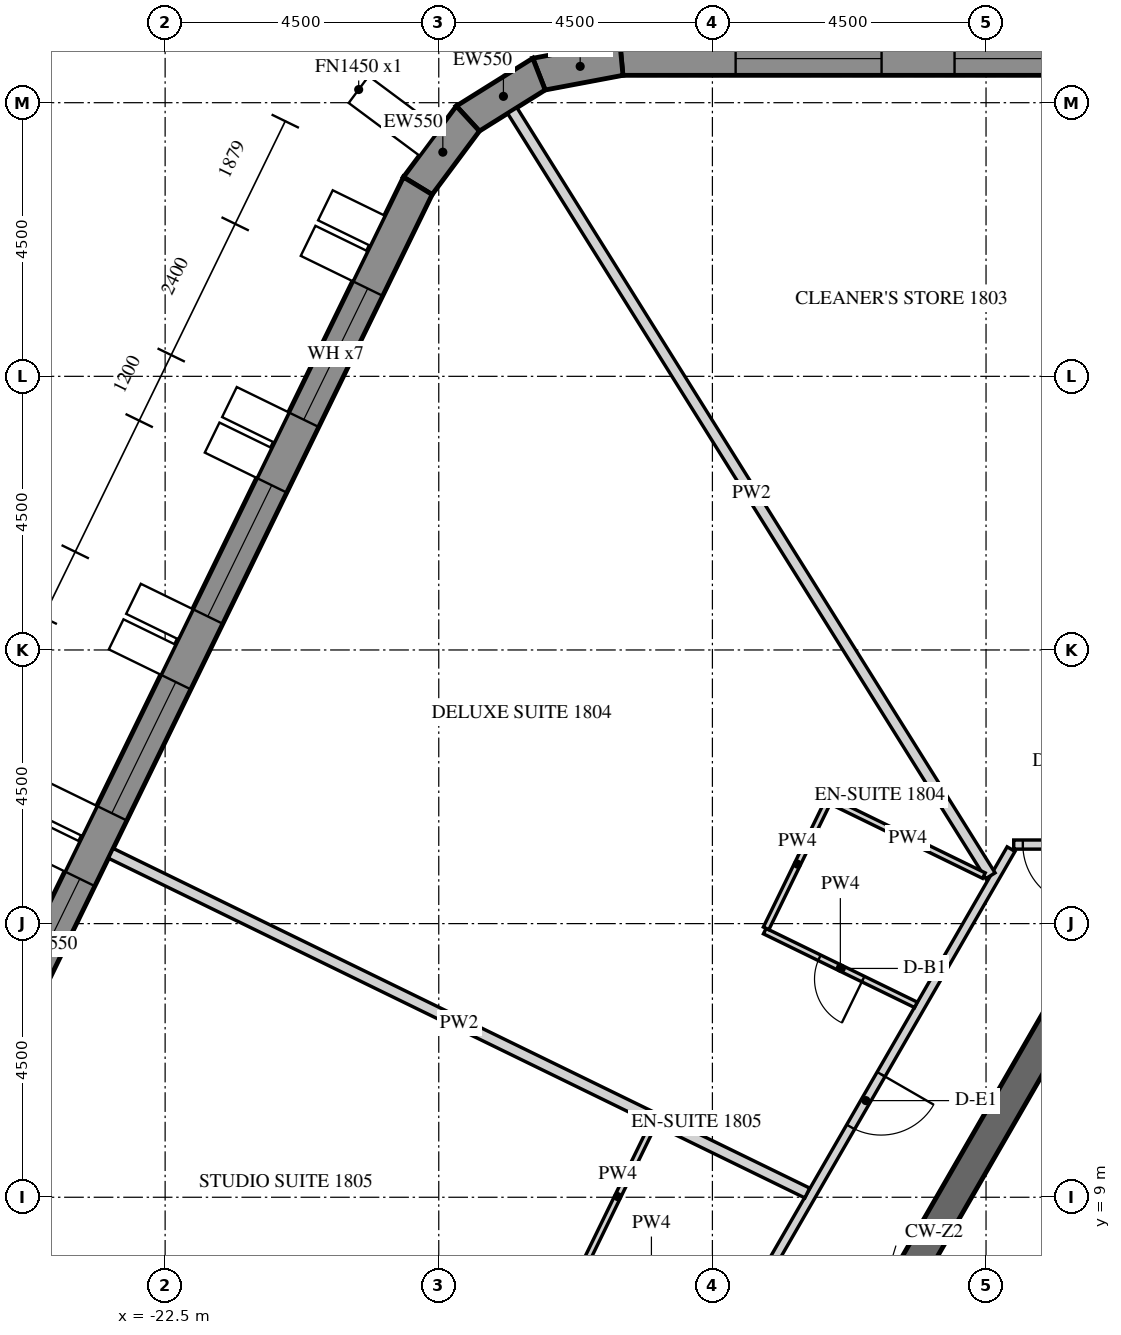
"""IFC4 building model, lengths in metres.
Left out: names, types, materials, properties, quantities, classifications, styles, units other than length and angle.
Written with IfcOpenShell. Run it as: python <this file> out.ifc"""

import sys

from ifc_helpers import new_model, si_unit, direction, frame, frame_2d, origin, place, context, subcontext, project, spatial, polyline, rectangle, outline, extrude, element, fill, save


model = new_model("IFC4")
c1 = context("Model", 3, precision=1e-05, world=origin(), true_north=direction((0.0, 1.0)))
c2 = subcontext(c1, "Body", "Model", "MODEL_VIEW")
j1 = project(units=[si_unit("LENGTHUNIT", "METRE"), si_unit("PLANEANGLEUNIT", "RADIAN")], contexts=[c1])
p1 = place(None, origin())
s1 = spatial("IfcSite", under=j1, at=p1, CompositionType="ELEMENT")
p2 = place(p1, origin())
s2 = spatial("IfcBuilding", under=s1, at=p2, CompositionType="ELEMENT")
p3 = place(p2, frame((0.0, 0.0, 226.8)))
s3 = spatial("IfcBuildingStorey", under=s2, at=p3, CompositionType="ELEMENT", Elevation=226.8)
p4 = place(p3, frame((12.761, 27.725, -0.15), z_axis=(0.0, 0.0, 1.0), x_axis=(-1.0, 0.0, 0.0)))
e1 = element("IfcWall", 1, at=p4, inside=s3, PredefinedType="SOLIDWALL", context=c2, shape_type="SweptSolid", body=[
    extrude(outline(polyline([(-0.022, -0.275), (27.783, -0.275), (27.732, 0.275), (0.022, 0.275), (-0.022, -0.275)])), origin(), (0.0, 0.0, 1.0), 3.9),
])
p5 = place(p4, frame((1.879, 0.0, 1.05)))
e2 = element("IfcOpeningElement", 2, at=p5, cuts=e1, PredefinedType="OPENING", context=c2, shape_type="SweptSolid", body=[
    extrude(rectangle(XDim=2.4, YDim=2.4, at=frame_2d((1.2, 1.2))), frame((0.0, 0.285, 0.0), z_axis=(0.0, -1.0, 0.0), x_axis=(1.0, 0.0, 0.0)), (0.0, 0.0, 1.0), 0.57),
])
p6 = place(p4, frame((5.479, 0.0, 1.05)))
e3 = element("IfcOpeningElement", 3, at=p6, cuts=e1, PredefinedType="OPENING", context=c2, shape_type="SweptSolid", body=[
    extrude(rectangle(XDim=2.4, YDim=2.4, at=frame_2d((1.2, 1.2))), frame((0.0, 0.285, 0.0), z_axis=(0.0, -1.0, 0.0), x_axis=(1.0, 0.0, 0.0)), (0.0, 0.0, 1.0), 0.57),
])
p7 = place(p4, frame((9.079, 0.0, 1.05)))
e4 = element("IfcOpeningElement", 4, at=p7, cuts=e1, PredefinedType="OPENING", context=c2, shape_type="SweptSolid", body=[
    extrude(rectangle(XDim=2.4, YDim=2.4, at=frame_2d((1.2, 1.2))), frame((0.0, 0.285, 0.0), z_axis=(0.0, -1.0, 0.0), x_axis=(1.0, 0.0, 0.0)), (0.0, 0.0, 1.0), 0.57),
])
p8 = place(p4, frame((12.679, 0.0, 1.05)))
e5 = element("IfcOpeningElement", 5, at=p8, cuts=e1, PredefinedType="OPENING", context=c2, shape_type="SweptSolid", body=[
    extrude(rectangle(XDim=2.4, YDim=2.4, at=frame_2d((1.2, 1.2))), frame((0.0, 0.285, 0.0), z_axis=(0.0, -1.0, 0.0), x_axis=(1.0, 0.0, 0.0)), (0.0, 0.0, 1.0), 0.57),
])
p9 = place(p4, frame((16.279, 0.0, 1.05)))
e6 = element("IfcOpeningElement", 6, at=p9, cuts=e1, PredefinedType="OPENING", context=c2, shape_type="SweptSolid", body=[
    extrude(rectangle(XDim=2.4, YDim=2.4, at=frame_2d((1.2, 1.2))), frame((0.0, 0.285, 0.0), z_axis=(0.0, -1.0, 0.0), x_axis=(1.0, 0.0, 0.0)), (0.0, 0.0, 1.0), 0.57),
])
p10 = place(p4, frame((19.879, 0.0, 1.05)))
e7 = element("IfcOpeningElement", 7, at=p10, cuts=e1, PredefinedType="OPENING", context=c2, shape_type="SweptSolid", body=[
    extrude(rectangle(XDim=2.4, YDim=2.4, at=frame_2d((1.2, 1.2))), frame((0.0, 0.285, 0.0), z_axis=(0.0, -1.0, 0.0), x_axis=(1.0, 0.0, 0.0)), (0.0, 0.0, 1.0), 0.57),
])
p11 = place(p4, frame((23.479, 0.0, 1.05)))
e8 = element("IfcOpeningElement", 8, at=p11, cuts=e1, PredefinedType="OPENING", context=c2, shape_type="SweptSolid", body=[
    extrude(rectangle(XDim=2.4, YDim=2.4, at=frame_2d((1.2, 1.2))), frame((0.0, 0.285, 0.0), z_axis=(0.0, -1.0, 0.0), x_axis=(1.0, 0.0, 0.0)), (0.0, 0.0, 1.0), 0.57),
])
p12 = place(p3, frame((-14.997, 27.725, -0.15), z_axis=(0.0, 0.0, 1.0), x_axis=(-0.982705443133, -0.185175624845, 0.0)))
e9 = element("IfcWall", 9, at=p12, inside=s3, PredefinedType="SOLIDWALL", context=c2, shape_type="SweptSolid", body=[
    extrude(outline(polyline([(-0.026, -0.275), (1.431, -0.275), (1.327, 0.275), (0.026, 0.275), (-0.026, -0.275)])), origin(), (0.0, 0.0, 1.0), 3.9),
])
p13 = place(p3, frame((-16.352, 27.47, -0.15), z_axis=(0.0, 0.0, 1.0), x_axis=(-0.848057977594, -0.5299034503, 0.0)))
e10 = element("IfcWall", 10, at=p13, inside=s3, PredefinedType="SOLIDWALL", context=c2, shape_type="SweptSolid", body=[
    extrude(outline(polyline([(-0.052, -0.275), (1.431, -0.275), (1.327, 0.275), (0.052, 0.275), (-0.052, -0.275)])), origin(), (0.0, 0.0, 1.0), 3.9),
])
p14 = place(p3, frame((-17.521, 26.739, -0.15), z_axis=(0.0, 0.0, 1.0), x_axis=(-0.597135295884, -0.802140535324, 0.0)))
e11 = element("IfcWall", 11, at=p14, inside=s3, PredefinedType="SOLIDWALL", context=c2, shape_type="SweptSolid", body=[
    extrude(outline(polyline([(-0.052, -0.275), (1.405, -0.275), (1.354, 0.275), (0.052, 0.275), (-0.052, -0.275)])), origin(), (0.0, 0.0, 1.0), 3.9),
])
p15 = place(p3, frame((-18.345, 25.633, -0.15), z_axis=(0.0, 0.0, 1.0), x_axis=(-0.43837181828, -0.898793718791, 0.0)))
e12 = element("IfcWall", 12, at=p15, inside=s3, PredefinedType="SOLIDWALL", context=c2, shape_type="SweptSolid", body=[
    extrude(outline(polyline([(-0.026, -0.275), (27.78, -0.275), (27.735, 0.275), (0.026, 0.275), (-0.026, -0.275)])), origin(), (0.0, 0.0, 1.0), 3.9),
])
p16 = place(p15, frame((1.879, 0.0, 1.05)))
e13 = element("IfcOpeningElement", 13, at=p16, cuts=e12, PredefinedType="OPENING", context=c2, shape_type="SweptSolid", body=[
    extrude(rectangle(XDim=2.4, YDim=2.4, at=frame_2d((1.2, 1.2))), frame((0.0, 0.285, 0.0), z_axis=(0.0, -1.0, 0.0), x_axis=(1.0, 0.0, 0.0)), (0.0, 0.0, 1.0), 0.57),
])
p17 = place(p15, frame((5.479, 0.0, 1.05)))
e14 = element("IfcOpeningElement", 14, at=p17, cuts=e12, PredefinedType="OPENING", context=c2, shape_type="SweptSolid", body=[
    extrude(rectangle(XDim=2.4, YDim=2.4, at=frame_2d((1.2, 1.2))), frame((0.0, 0.285, 0.0), z_axis=(0.0, -1.0, 0.0), x_axis=(1.0, 0.0, 0.0)), (0.0, 0.0, 1.0), 0.57),
])
p18 = place(p15, frame((9.079, 0.0, 1.05)))
e15 = element("IfcOpeningElement", 15, at=p18, cuts=e12, PredefinedType="OPENING", context=c2, shape_type="SweptSolid", body=[
    extrude(rectangle(XDim=2.4, YDim=2.4, at=frame_2d((1.2, 1.2))), frame((0.0, 0.285, 0.0), z_axis=(0.0, -1.0, 0.0), x_axis=(1.0, 0.0, 0.0)), (0.0, 0.0, 1.0), 0.57),
])
p19 = place(p15, frame((12.679, 0.0, 1.05)))
e16 = element("IfcOpeningElement", 16, at=p19, cuts=e12, PredefinedType="OPENING", context=c2, shape_type="SweptSolid", body=[
    extrude(rectangle(XDim=2.4, YDim=2.4, at=frame_2d((1.2, 1.2))), frame((0.0, 0.285, 0.0), z_axis=(0.0, -1.0, 0.0), x_axis=(1.0, 0.0, 0.0)), (0.0, 0.0, 1.0), 0.57),
])
p20 = place(p15, frame((16.279, 0.0, 1.05)))
e17 = element("IfcOpeningElement", 17, at=p20, cuts=e12, PredefinedType="OPENING", context=c2, shape_type="SweptSolid", body=[
    extrude(rectangle(XDim=2.4, YDim=2.4, at=frame_2d((1.2, 1.2))), frame((0.0, 0.285, 0.0), z_axis=(0.0, -1.0, 0.0), x_axis=(1.0, 0.0, 0.0)), (0.0, 0.0, 1.0), 0.57),
])
p21 = place(p15, frame((19.879, 0.0, 1.05)))
e18 = element("IfcOpeningElement", 18, at=p21, cuts=e12, PredefinedType="OPENING", context=c2, shape_type="SweptSolid", body=[
    extrude(rectangle(XDim=2.4, YDim=2.4, at=frame_2d((1.2, 1.2))), frame((0.0, 0.285, 0.0), z_axis=(0.0, -1.0, 0.0), x_axis=(1.0, 0.0, 0.0)), (0.0, 0.0, 1.0), 0.57),
])
p22 = place(p15, frame((23.479, 0.0, 1.05)))
e19 = element("IfcOpeningElement", 19, at=p22, cuts=e12, PredefinedType="OPENING", context=c2, shape_type="SweptSolid", body=[
    extrude(rectangle(XDim=2.4, YDim=2.4, at=frame_2d((1.2, 1.2))), frame((0.0, 0.285, 0.0), z_axis=(0.0, -1.0, 0.0), x_axis=(1.0, 0.0, 0.0)), (0.0, 0.0, 1.0), 0.57),
])
p23 = place(p3, frame((-7.361, 12.75, -0.15), z_axis=(0.0, 0.0, 1.0), x_axis=(-0.50000571537, -0.866022103989, 0.0)))
e20 = element("IfcWall", 20, at=p23, inside=s3, PredefinedType="SHEAR", context=c2, shape_type="SweptSolid", body=[
    extrude(outline(polyline([(-0.144, -0.25), (14.867, -0.25), (14.578, 0.25), (0.144, 0.25), (-0.144, -0.25)])), origin(), (0.0, 0.0, 1.0), 3.9),
])
p24 = place(p23, frame((6.49, 0.0, 0.15)))
e21 = element("IfcOpeningElement", 21, at=p24, cuts=e20, PredefinedType="OPENING", context=c2, shape_type="SweptSolid", body=[
    extrude(rectangle(XDim=1.8, YDim=2.4, at=frame_2d((0.9, 1.2))), frame((0.0, 0.26, 0.0), z_axis=(0.0, -1.0, 0.0), x_axis=(1.0, 0.0, 0.0)), (0.0, 0.0, 1.0), 0.52),
])
p25 = place(p3, frame((-5.673, 9.825, -0.15), z_axis=(0.0, 0.0, 1.0), x_axis=(-0.499995046907, -0.866028263435, 0.0)))
e22 = element("IfcWall", 22, at=p25, inside=s3, PredefinedType="SHEAR", context=c2, shape_type="SweptSolid", body=[
    extrude(outline(polyline([(-0.101, -0.175), (11.446, -0.175), (11.244, 0.175), (0.101, 0.175), (-0.101, -0.175)])), origin(), (0.0, 0.0, 1.0), 3.9),
])
p26 = place(p25, frame((4.801, 0.0, 0.15)))
e23 = element("IfcOpeningElement", 23, at=p26, cuts=e22, PredefinedType="OPENING", context=c2, shape_type="SweptSolid", body=[
    extrude(rectangle(XDim=1.8, YDim=2.4, at=frame_2d((0.9, 1.2))), frame((0.0, 0.185, 0.0), z_axis=(0.0, -1.0, 0.0), x_axis=(1.0, 0.0, 0.0)), (0.0, 0.0, 1.0), 0.37),
])
p27 = place(p3, frame((6.091, 14.8, 0.0), z_axis=(0.0, 0.0, 1.0), x_axis=(-1.0, 0.0, 0.0)))
e24 = element("IfcWall", 24, at=p27, inside=s3, PredefinedType="PARTITIONING", context=c2, shape_type="SweptSolid", body=[
    extrude(rectangle(XDim=14.636, YDim=0.15, at=frame_2d((7.318, 0.0))), origin(), (0.0, 0.0, 1.0), 2.988),
])
p28 = place(p27, frame((2.661, 0.0, 0.0)))
e25 = element("IfcOpeningElement", 25, at=p28, cuts=e24, PredefinedType="OPENING", context=c2, shape_type="SweptSolid", body=[
    extrude(rectangle(XDim=1.0, YDim=2.1, at=frame_2d((0.5, 1.05))), frame((0.0, 0.085, 0.0), z_axis=(0.0, -1.0, 0.0), x_axis=(1.0, 0.0, 0.0)), (0.0, 0.0, 1.0), 0.17),
])
p29 = place(p27, frame((10.309, 0.0, 0.0)))
e26 = element("IfcOpeningElement", 26, at=p29, cuts=e24, PredefinedType="OPENING", context=c2, shape_type="SweptSolid", body=[
    extrude(rectangle(XDim=1.0, YDim=2.1, at=frame_2d((0.5, 1.05))), frame((0.0, 0.085, 0.0), z_axis=(0.0, -1.0, 0.0), x_axis=(1.0, 0.0, 0.0)), (0.0, 0.0, 1.0), 0.17),
])
p30 = place(p27, frame((13.486, 0.0, 0.0)))
e27 = element("IfcOpeningElement", 27, at=p30, cuts=e24, PredefinedType="OPENING", context=c2, shape_type="SweptSolid", body=[
    extrude(rectangle(XDim=1.0, YDim=2.1, at=frame_2d((0.5, 1.05))), frame((0.0, 0.085, 0.0), z_axis=(0.0, -1.0, 0.0), x_axis=(1.0, 0.0, 0.0)), (0.0, 0.0, 1.0), 0.17),
])
p31 = place(p3, frame((-8.588, 14.725, 0.0), z_axis=(0.0, 0.0, 1.0), x_axis=(-0.499999926766, -0.866025446066, 0.0)))
e28 = element("IfcWall", 28, at=p31, inside=s3, PredefinedType="PARTITIONING", context=c2, shape_type="SweptSolid", body=[
    extrude(rectangle(XDim=13.786, YDim=0.15, at=frame_2d((6.893, 0.0))), origin(), (0.0, 0.0, 1.0), 2.988),
])
p32 = place(p31, frame((4.276, 0.0, 0.0)))
e29 = element("IfcOpeningElement", 29, at=p32, cuts=e28, PredefinedType="OPENING", context=c2, shape_type="SweptSolid", body=[
    extrude(rectangle(XDim=1.0, YDim=2.1, at=frame_2d((0.5, 1.05))), frame((0.0, 0.085, 0.0), z_axis=(0.0, -1.0, 0.0), x_axis=(1.0, 0.0, 0.0)), (0.0, 0.0, 1.0), 0.17),
])
p33 = place(p31, frame((11.073, 0.0, 0.0)))
e30 = element("IfcOpeningElement", 30, at=p33, cuts=e28, PredefinedType="OPENING", context=c2, shape_type="SweptSolid", body=[
    extrude(rectangle(XDim=1.0, YDim=2.1, at=frame_2d((0.5, 1.05))), frame((0.0, 0.085, 0.0), z_axis=(0.0, -1.0, 0.0), x_axis=(1.0, 0.0, 0.0)), (0.0, 0.0, 1.0), 0.17),
])
p34 = place(p3, frame((-16.791, 26.871, 0.0), z_axis=(0.0, 0.0, 1.0), x_axis=(0.529927950822, -0.848042668111, 0.0)))
e31 = element("IfcWall", 31, at=p34, inside=s3, PredefinedType="PARTITIONING", context=c2, shape_type="SweptSolid", body=[
    extrude(rectangle(XDim=14.839, YDim=0.18, at=frame_2d((7.419, 0.0))), origin(), (0.0, 0.0, 1.0), 2.988),
])
p35 = place(p3, frame((-10.153, 12.164, 0.0), z_axis=(0.0, 0.0, 1.0), x_axis=(-0.898780323471, 0.438399281638, 0.0)))
e32 = element("IfcWall", 32, at=p35, inside=s3, PredefinedType="PARTITIONING", context=c2, shape_type="SweptSolid", body=[
    extrude(rectangle(XDim=2.766, YDim=0.1, at=frame_2d((1.383, 0.0))), origin(), (0.0, 0.0, 1.0), 2.988),
])
p36 = place(p35, frame((0.966, 0.0, 0.0)))
e33 = element("IfcOpeningElement", 33, at=p36, cuts=e32, PredefinedType="OPENING", context=c2, shape_type="SweptSolid", body=[
    extrude(rectangle(XDim=0.8, YDim=2.1, at=frame_2d((0.4, 1.05))), frame((0.0, 0.06, 0.0), z_axis=(0.0, -1.0, 0.0), x_axis=(1.0, 0.0, 0.0)), (0.0, 0.0, 1.0), 0.12),
])
p37 = place(p3, frame((-12.617, 13.422, 0.0), z_axis=(0.0, 0.0, 1.0), x_axis=(0.438298773825, 0.898829341345, 0.0)))
e34 = element("IfcWall", 34, at=p37, inside=s3, PredefinedType="PARTITIONING", context=c2, shape_type="SweptSolid", body=[
    extrude(rectangle(XDim=2.35, YDim=0.1, at=frame_2d((1.175, 0.0))), origin(), (0.0, 0.0, 1.0), 2.988),
])
p38 = place(p3, frame((-11.542, 15.512, 0.0), z_axis=(0.0, 0.0, 1.0), x_axis=(0.898813033265, -0.438332215599, 0.0)))
e35 = element("IfcWall", 35, at=p38, inside=s3, PredefinedType="PARTITIONING", context=c2, shape_type="SweptSolid", body=[
    extrude(rectangle(XDim=2.789, YDim=0.1, at=frame_2d((1.395, 0.0))), origin(), (0.0, 0.0, 1.0), 2.988),
])
p39 = place(p3, frame((-23.393, 14.656, 0.0), z_axis=(0.0, 0.0, 1.0), x_axis=(0.898790356386, -0.438378712152, 0.0)))
e36 = element("IfcWall", 36, at=p39, inside=s3, PredefinedType="PARTITIONING", context=c2, shape_type="SweptSolid", body=[
    extrude(rectangle(XDim=12.743, YDim=0.18, at=frame_2d((6.372, 0.0))), origin(), (0.0, 0.0, 1.0), 2.988),
])
p40 = place(p3, frame((-15.641, 7.815, 0.0), z_axis=(0.0, 0.0, 1.0), x_axis=(0.438380229518, 0.898789616299, 0.0)))
e37 = element("IfcWall", 37, at=p40, inside=s3, PredefinedType="PARTITIONING", context=c2, shape_type="SweptSolid", body=[
    extrude(rectangle(XDim=2.66, YDim=0.1, at=frame_2d((1.33, 0.0))), origin(), (0.0, 0.0, 1.0), 2.988),
])
p41 = place(p3, frame((-26.549, 8.185, 0.0), z_axis=(0.0, 0.0, 1.0), x_axis=(0.898794655758, -0.438369897211, 0.0)))
e38 = element("IfcWall", 38, at=p41, inside=s3, PredefinedType="PARTITIONING", context=c2, shape_type="SweptSolid", body=[
    extrude(rectangle(XDim=11.369, YDim=0.18, at=frame_2d((5.684, 0.0))), origin(), (0.0, 0.0, 1.0), 2.988),
])
p42 = place(p10, frame((0.0, 0.205, 0.0)))
e39 = element("IfcWindow", 39, at=p42, inside=s3, PartitioningType="DOUBLE_PANEL_VERTICAL", PredefinedType="WINDOW", context=c2, shape_type="SweptSolid", body=[
    extrude(rectangle(XDim=2.4, YDim=2.4, at=frame_2d((1.2, 1.2))), frame((0.0, 0.03, 0.0), z_axis=(0.0, -1.0, 0.0), x_axis=(1.0, 0.0, 0.0)), (0.0, 0.0, 1.0), 0.06),
])
fill(e7, e39)
p43 = place(p11, frame((0.0, 0.205, 0.0)))
e40 = element("IfcWindow", 40, at=p43, inside=s3, PartitioningType="DOUBLE_PANEL_VERTICAL", PredefinedType="WINDOW", context=c2, shape_type="SweptSolid", body=[
    extrude(rectangle(XDim=2.4, YDim=2.4, at=frame_2d((1.2, 1.2))), frame((0.0, 0.03, 0.0), z_axis=(0.0, -1.0, 0.0), x_axis=(1.0, 0.0, 0.0)), (0.0, 0.0, 1.0), 0.06),
])
fill(e8, e40)
p44 = place(p16, frame((0.0, 0.205, 0.0)))
e41 = element("IfcWindow", 41, at=p44, inside=s3, PartitioningType="DOUBLE_PANEL_VERTICAL", PredefinedType="WINDOW", context=c2, shape_type="SweptSolid", body=[
    extrude(rectangle(XDim=2.4, YDim=2.4, at=frame_2d((1.2, 1.2))), frame((0.0, 0.03, 0.0), z_axis=(0.0, -1.0, 0.0), x_axis=(1.0, 0.0, 0.0)), (0.0, 0.0, 1.0), 0.06),
])
fill(e13, e41)
p45 = place(p17, frame((0.0, 0.205, 0.0)))
e42 = element("IfcWindow", 42, at=p45, inside=s3, PartitioningType="DOUBLE_PANEL_VERTICAL", PredefinedType="WINDOW", context=c2, shape_type="SweptSolid", body=[
    extrude(rectangle(XDim=2.4, YDim=2.4, at=frame_2d((1.2, 1.2))), frame((0.0, 0.03, 0.0), z_axis=(0.0, -1.0, 0.0), x_axis=(1.0, 0.0, 0.0)), (0.0, 0.0, 1.0), 0.06),
])
fill(e14, e42)
p46 = place(p18, frame((0.0, 0.205, 0.0)))
e43 = element("IfcWindow", 43, at=p46, inside=s3, PartitioningType="DOUBLE_PANEL_VERTICAL", PredefinedType="WINDOW", context=c2, shape_type="SweptSolid", body=[
    extrude(rectangle(XDim=2.4, YDim=2.4, at=frame_2d((1.2, 1.2))), frame((0.0, 0.03, 0.0), z_axis=(0.0, -1.0, 0.0), x_axis=(1.0, 0.0, 0.0)), (0.0, 0.0, 1.0), 0.06),
])
fill(e15, e43)
p47 = place(p19, frame((0.0, 0.205, 0.0)))
e44 = element("IfcWindow", 44, at=p47, inside=s3, PartitioningType="DOUBLE_PANEL_VERTICAL", PredefinedType="WINDOW", context=c2, shape_type="SweptSolid", body=[
    extrude(rectangle(XDim=2.4, YDim=2.4, at=frame_2d((1.2, 1.2))), frame((0.0, 0.03, 0.0), z_axis=(0.0, -1.0, 0.0), x_axis=(1.0, 0.0, 0.0)), (0.0, 0.0, 1.0), 0.06),
])
fill(e16, e44)
p48 = place(p30, origin())
e45 = element("IfcDoor", 45, at=p48, inside=s3, OperationType="SINGLE_SWING_LEFT", PredefinedType="DOOR", context=c2, shape_type="SweptSolid", body=[
    extrude(rectangle(XDim=1.0, YDim=2.1, at=frame_2d((0.5, 1.05))), frame((0.0, 0.025, 0.0), z_axis=(0.0, -1.0, 0.0), x_axis=(1.0, 0.0, 0.0)), (0.0, 0.0, 1.0), 0.05),
])
fill(e27, e45)
p49 = place(p32, origin())
e46 = element("IfcDoor", 46, at=p49, inside=s3, OperationType="SINGLE_SWING_LEFT", PredefinedType="DOOR", context=c2, shape_type="SweptSolid", body=[
    extrude(rectangle(XDim=1.0, YDim=2.1, at=frame_2d((0.5, 1.05))), frame((0.0, 0.025, 0.0), z_axis=(0.0, -1.0, 0.0), x_axis=(1.0, 0.0, 0.0)), (0.0, 0.0, 1.0), 0.05),
])
fill(e29, e46)
p50 = place(p36, origin())
e47 = element("IfcDoor", 47, at=p50, inside=s3, OperationType="SINGLE_SWING_LEFT", PredefinedType="DOOR", context=c2, shape_type="SweptSolid", body=[
    extrude(rectangle(XDim=0.8, YDim=2.1, at=frame_2d((0.4, 1.05))), frame((0.0, 0.025, 0.0), z_axis=(0.0, -1.0, 0.0), x_axis=(1.0, 0.0, 0.0)), (0.0, 0.0, 1.0), 0.05),
])
fill(e33, e47)
save(model, sys.argv[1])
